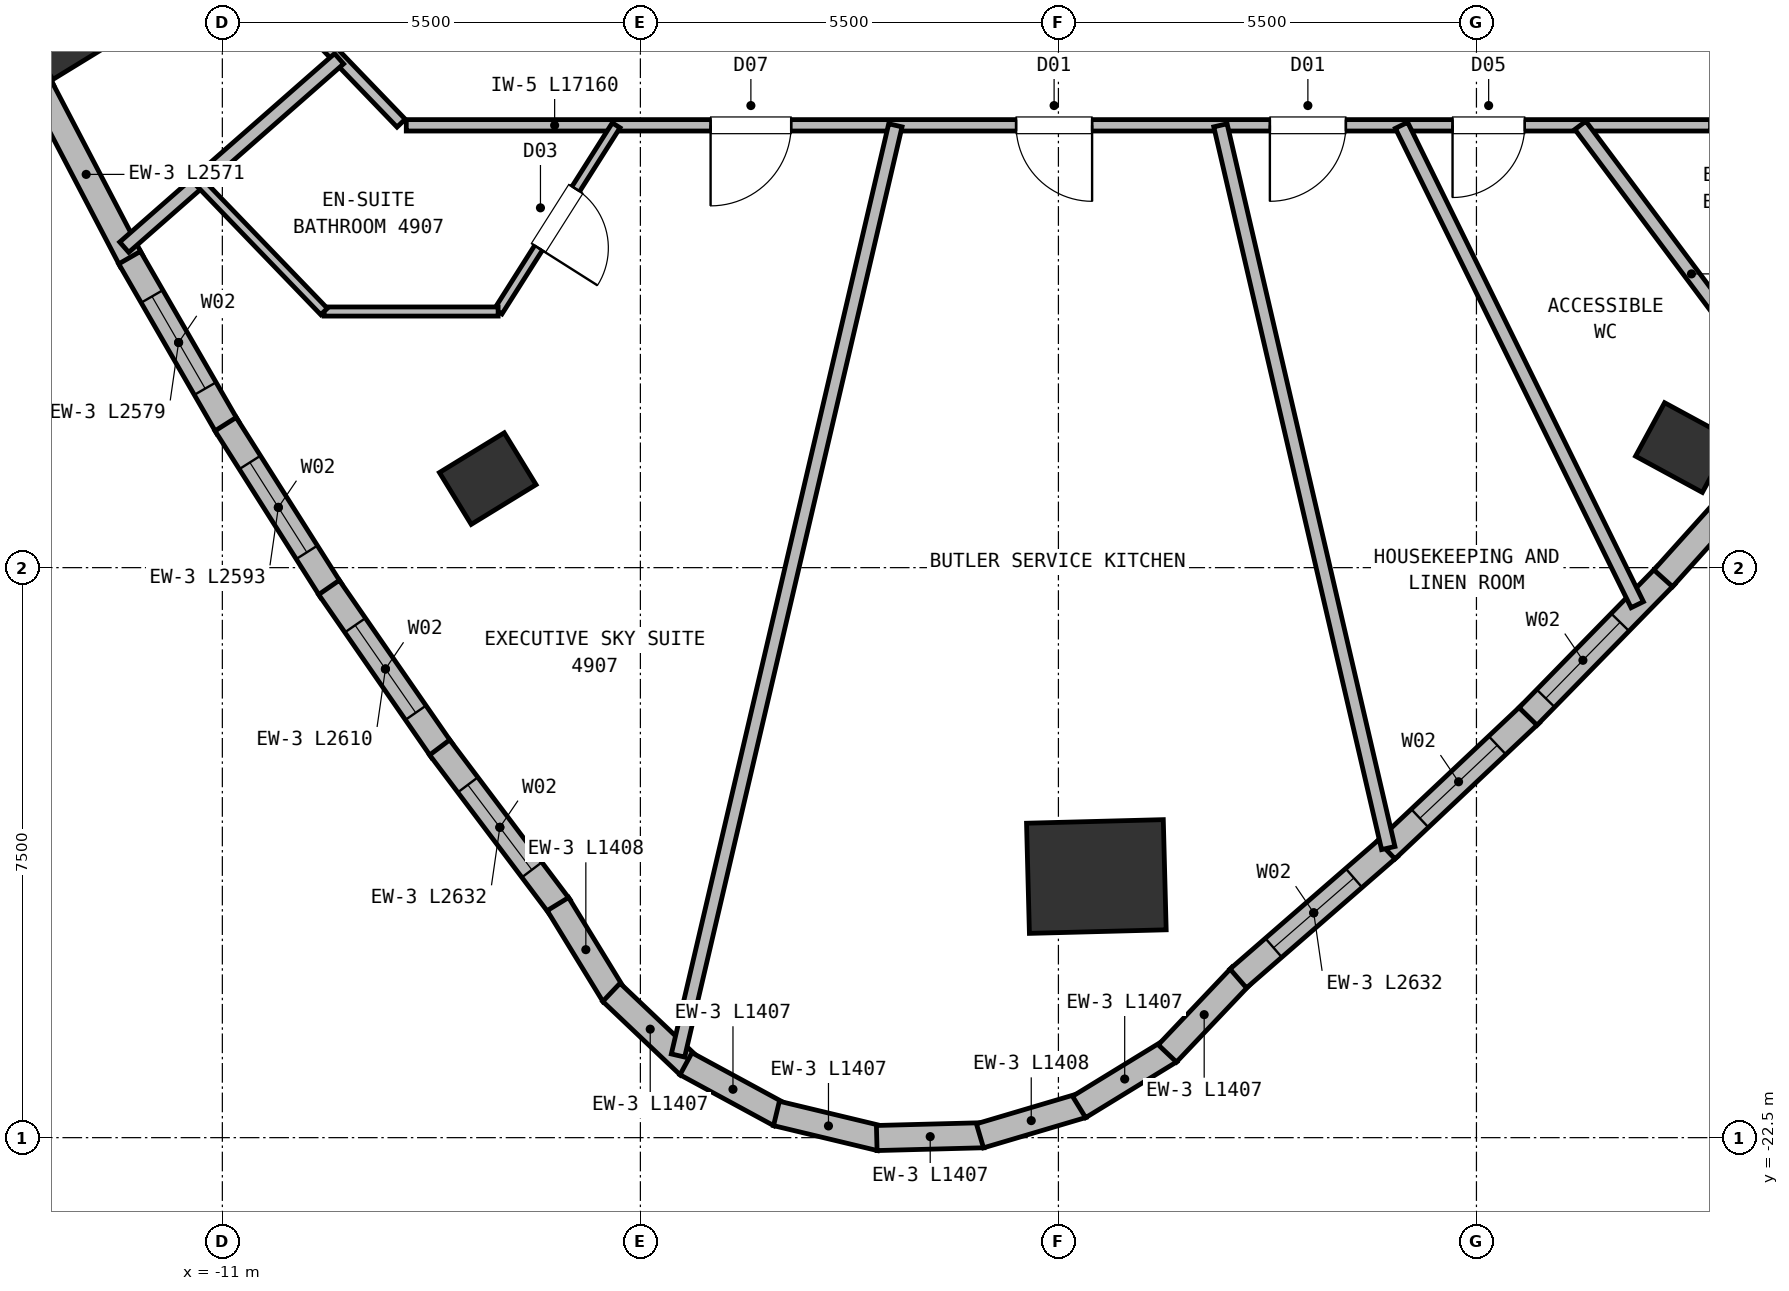
"""IFC4 building model, lengths in metres.
Left out: names, types, materials, properties, quantities, classifications, styles, units other than length and angle.
Written with IfcOpenShell. Run it as: python <this file> out.ifc"""

import sys

from ifc_helpers import new_model, si_unit, direction, frame, frame_2d, origin, origin_2d, place, context, subcontext, project, spatial, rectangle, extrude, element, fill, save


model = new_model("IFC4")
c1 = context("Model", 3, precision=1e-05, world=origin(), true_north=direction((0.0, 1.0)))
c2 = subcontext(c1, "Body", "Model", "MODEL_VIEW")
j1 = project(units=[si_unit("LENGTHUNIT", "METRE"), si_unit("PLANEANGLEUNIT", "RADIAN")], contexts=[c1])
p1 = place(None, origin())
s1 = spatial("IfcSite", under=j1, at=p1, CompositionType="ELEMENT")
p2 = place(p1, origin())
s2 = spatial("IfcBuilding", under=s1, at=p2, CompositionType="ELEMENT")
p3 = place(p2, frame((0.0, 0.0, 186.55)))
s3 = spatial("IfcBuildingStorey", under=s2, at=p3, CompositionType="ELEMENT", Elevation=186.55)
for number, where, z_axis, x_axis in (
    (1, (-13.012, -7.974, 0.0), (0.0, 0.0, 1.0), (-0.522, 0.853, 0.0)),
    (2, (-7.508, -13.828, 0.0), (0.0, 0.0, 1.0), (-0.522, 0.853, 0.0)),
):
    element("IfcColumn", number, at=place(p3, frame(where, z_axis=z_axis, x_axis=x_axis)), inside=s3, PredefinedType="COLUMN", context=c2, shape_type="SweptSolid", body=[
        extrude(rectangle(XDim=0.8, YDim=1.0, at=origin_2d()), origin(), (0.0, 0.0, 1.0), 3.8),
    ])
p4 = place(p3, frame((0.499, -19.064, 0.0), z_axis=(0.0, 0.0, 1.0), x_axis=(-0.026176948308, 0.999657324976, 0.0)))
e3 = element("IfcColumn", 3, at=p4, inside=s3, PredefinedType="COLUMN", context=c2, shape_type="SweptSolid", body=[
    extrude(rectangle(XDim=1.45, YDim=1.8, at=origin_2d()), origin(), (0.0, 0.0, 1.0), 3.8),
])
p5 = place(p3, frame((8.224, -13.42, 0.0), z_axis=(0.0, 0.0, 1.0), x_axis=(0.47715876026, 0.878817112662, 0.0)))
e4 = element("IfcColumn", 4, at=p5, inside=s3, PredefinedType="COLUMN", context=c2, shape_type="SweptSolid", body=[
    extrude(rectangle(XDim=0.8, YDim=1.0, at=origin_2d()), origin(), (0.0, 0.0, 1.0), 3.8),
])
p6 = place(p3, frame((-13.365, -8.731, 0.0), z_axis=(0.0, 0.0, 1.0), x_axis=(-0.425774125911, 0.90482948322, 0.0)))
e5 = element("IfcWall", 5, at=p6, inside=s3, PredefinedType="SOLIDWALL", context=c2, shape_type="SweptSolid", body=[
    extrude(rectangle(XDim=2.566, YDim=0.33, at=frame_2d((1.283, 0.0))), origin(), (0.0, 0.0, 1.0), 3.55),
])
p7 = place(p3, frame((-12.196, -10.965, 0.0), z_axis=(0.0, 0.0, 1.0), x_axis=(-0.463361004434, 0.886169611062, 0.0)))
e6 = element("IfcWall", 6, at=p7, inside=s3, PredefinedType="SOLIDWALL", context=c2, shape_type="SweptSolid", body=[
    extrude(rectangle(XDim=2.571, YDim=0.33, at=frame_2d((1.285, 0.0))), origin(), (0.0, 0.0, 1.0), 3.55),
])
p8 = place(p3, frame((-10.931, -13.155, 0.0), z_axis=(0.0, 0.0, 1.0), x_axis=(-0.499875407217, 0.866097325513, 0.0)))
e7 = element("IfcWall", 7, at=p8, inside=s3, PredefinedType="SOLIDWALL", context=c2, shape_type="SweptSolid", body=[
    extrude(rectangle(XDim=2.579, YDim=0.33, at=frame_2d((1.29, 0.0))), origin(), (0.0, 0.0, 1.0), 3.55),
])
p9 = place(p8, frame((0.59, 0.0, 0.72)))
e8 = element("IfcOpeningElement", 8, at=p9, cuts=e7, PredefinedType="OPENING", context=c2, shape_type="SweptSolid", body=[
    extrude(rectangle(XDim=1.4, YDim=1.84, at=frame_2d((0.7, 0.92))), frame((0.0, 0.175, 0.0), z_axis=(0.0, -1.0, 0.0), x_axis=(1.0, 0.0, 0.0)), (0.0, 0.0, 1.0), 0.35),
])
p10 = place(p3, frame((-9.569, -15.302, 0.0), z_axis=(0.0, 0.0, 1.0), x_axis=(-0.535186500918, 0.844733928072, 0.0)))
e9 = element("IfcWall", 9, at=p10, inside=s3, PredefinedType="SOLIDWALL", context=c2, shape_type="SweptSolid", body=[
    extrude(rectangle(XDim=2.593, YDim=0.33, at=frame_2d((1.296, 0.0))), origin(), (0.0, 0.0, 1.0), 3.55),
])
p11 = place(p10, frame((0.596, 0.0, 0.72)))
e10 = element("IfcOpeningElement", 10, at=p11, cuts=e9, PredefinedType="OPENING", context=c2, shape_type="SweptSolid", body=[
    extrude(rectangle(XDim=1.4, YDim=1.84, at=frame_2d((0.7, 0.92))), frame((0.0, 0.175, 0.0), z_axis=(0.0, -1.0, 0.0), x_axis=(1.0, 0.0, 0.0)), (0.0, 0.0, 1.0), 0.35),
])
p12 = place(p3, frame((-8.112, -17.406, 0.0), z_axis=(0.0, 0.0, 1.0), x_axis=(-0.569122418308, 0.822252803571, 0.0)))
e11 = element("IfcWall", 11, at=p12, inside=s3, PredefinedType="SOLIDWALL", context=c2, shape_type="SweptSolid", body=[
    extrude(rectangle(XDim=2.61, YDim=0.33, at=frame_2d((1.305, 0.0))), origin(), (0.0, 0.0, 1.0), 3.55),
])
p13 = place(p12, frame((0.605, 0.0, 0.72)))
e12 = element("IfcOpeningElement", 12, at=p13, cuts=e11, PredefinedType="OPENING", context=c2, shape_type="SweptSolid", body=[
    extrude(rectangle(XDim=1.4, YDim=1.84, at=frame_2d((0.7, 0.92))), frame((0.0, 0.175, 0.0), z_axis=(0.0, -1.0, 0.0), x_axis=(1.0, 0.0, 0.0)), (0.0, 0.0, 1.0), 0.35),
])
p14 = place(p3, frame((-6.557, -19.468, 0.0), z_axis=(0.0, 0.0, 1.0), x_axis=(-0.601735324528, 0.798695561034, 0.0)))
e13 = element("IfcWall", 13, at=p14, inside=s3, PredefinedType="SOLIDWALL", context=c2, shape_type="SweptSolid", body=[
    extrude(rectangle(XDim=2.632, YDim=0.33, at=frame_2d((1.316, 0.0))), origin(), (0.0, 0.0, 1.0), 3.55),
])
p15 = place(p14, frame((0.616, 0.0, 0.72)))
e14 = element("IfcOpeningElement", 14, at=p15, cuts=e13, PredefinedType="OPENING", context=c2, shape_type="SweptSolid", body=[
    extrude(rectangle(XDim=1.4, YDim=1.84, at=frame_2d((0.7, 0.92))), frame((0.0, 0.175, 0.0), z_axis=(0.0, -1.0, 0.0), x_axis=(1.0, 0.0, 0.0)), (0.0, 0.0, 1.0), 0.35),
])
for number, where, z_axis, x_axis in (
    (15, (-5.85, -20.627, 0.0), (0.0, 0.0, 1.0), (-0.522, 0.853, 0.0)),
    (16, (-4.86, -21.557, 0.0), (0.0, 0.0, 1.0), (-0.725, 0.688, 0.0)),
):
    element("IfcWall", number, at=place(p3, frame(where, z_axis=z_axis, x_axis=x_axis)), inside=s3, PredefinedType="SOLIDWALL", context=c2, shape_type="SweptSolid", body=[
        extrude(rectangle(XDim=1.407, YDim=0.33, at=frame_2d((0.704, 0.0))), origin(), (0.0, 0.0, 1.0), 3.55),
    ])
p16 = place(p3, frame((-3.663, -22.199, 0.0), z_axis=(0.0, 0.0, 1.0), x_axis=(-0.878861744685, 0.477076549129, 0.0)))
e17 = element("IfcWall", 17, at=p16, inside=s3, PredefinedType="SOLIDWALL", context=c2, shape_type="SweptSolid", body=[
    extrude(rectangle(XDim=1.407, YDim=0.33, at=frame_2d((0.704, 0.0))), origin(), (0.0, 0.0, 1.0), 3.55),
])
for number, where, z_axis, x_axis in (
    (18, (-2.341, -22.51, 0.0), (0.0, 0.0, 1.0), (-0.972, 0.233, 0.0)),
    (19, (-0.983, -22.468, 0.0), (0.0, 0.0, 1.0), (-1.0, -0.026, 0.0)),
    (20, (0.317, -22.076, 0.0), (0.0, 0.0, 1.0), (-0.959, -0.284, 0.0)),
):
    element("IfcWall", number, at=place(p3, frame(where, z_axis=z_axis, x_axis=x_axis)), inside=s3, PredefinedType="SOLIDWALL", context=c2, shape_type="SweptSolid", body=[
        extrude(rectangle(XDim=1.407, YDim=0.33, at=frame_2d((0.704, 0.0))), origin(), (0.0, 0.0, 1.0), 3.55),
    ])
p17 = place(p3, frame((1.472, -21.361, 0.0), z_axis=(0.0, 0.0, 1.0), x_axis=(-0.852633662668, -0.522509174355, 0.0)))
e21 = element("IfcWall", 21, at=p17, inside=s3, PredefinedType="SOLIDWALL", context=c2, shape_type="SweptSolid", body=[
    extrude(rectangle(XDim=1.407, YDim=0.33, at=frame_2d((0.704, 0.0))), origin(), (0.0, 0.0, 1.0), 3.55),
])
p18 = place(p3, frame((2.402, -20.371, 0.0), z_axis=(0.0, 0.0, 1.0), x_axis=(-0.688302566146, -0.725423722687, 0.0)))
e22 = element("IfcWall", 22, at=p18, inside=s3, PredefinedType="SOLIDWALL", context=c2, shape_type="SweptSolid", body=[
    extrude(rectangle(XDim=1.407, YDim=0.33, at=frame_2d((0.704, 0.0))), origin(), (0.0, 0.0, 1.0), 3.55),
])
p19 = place(p3, frame((4.352, -18.679, 0.0), z_axis=(0.0, 0.0, 1.0), x_axis=(-0.754647459821, -0.656130483505, 0.0)))
e23 = element("IfcWall", 23, at=p19, inside=s3, PredefinedType="SOLIDWALL", context=c2, shape_type="SweptSolid", body=[
    extrude(rectangle(XDim=2.632, YDim=0.33, at=frame_2d((1.316, 0.0))), origin(), (0.0, 0.0, 1.0), 3.55),
])
p20 = place(p19, frame((0.616, 0.0, 0.72)))
e24 = element("IfcOpeningElement", 24, at=p20, cuts=e23, PredefinedType="OPENING", context=c2, shape_type="SweptSolid", body=[
    extrude(rectangle(XDim=1.4, YDim=1.84, at=frame_2d((0.7, 0.92))), frame((0.0, 0.175, 0.0), z_axis=(0.0, -1.0, 0.0), x_axis=(1.0, 0.0, 0.0)), (0.0, 0.0, 1.0), 0.35),
])
p21 = place(p3, frame((6.215, -16.922, 0.0), z_axis=(0.0, 0.0, 1.0), x_axis=(-0.72774946529, -0.685843069346, 0.0)))
e25 = element("IfcWall", 25, at=p21, inside=s3, PredefinedType="SOLIDWALL", context=c2, shape_type="SweptSolid", body=[
    extrude(rectangle(XDim=2.61, YDim=0.33, at=frame_2d((1.305, 0.0))), origin(), (0.0, 0.0, 1.0), 3.55),
])
p22 = place(p21, frame((0.605, 0.0, 0.72)))
e26 = element("IfcOpeningElement", 26, at=p22, cuts=e25, PredefinedType="OPENING", context=c2, shape_type="SweptSolid", body=[
    extrude(rectangle(XDim=1.4, YDim=1.84, at=frame_2d((0.7, 0.92))), frame((0.0, 0.175, 0.0), z_axis=(0.0, -1.0, 0.0), x_axis=(1.0, 0.0, 0.0)), (0.0, 0.0, 1.0), 0.35),
])
p23 = place(p3, frame((7.991, -15.104, 0.0), z_axis=(0.0, 0.0, 1.0), x_axis=(-0.699057723408, -0.71506524132, 0.0)))
e27 = element("IfcWall", 27, at=p23, inside=s3, PredefinedType="SOLIDWALL", context=c2, shape_type="SweptSolid", body=[
    extrude(rectangle(XDim=2.593, YDim=0.33, at=frame_2d((1.296, 0.0))), origin(), (0.0, 0.0, 1.0), 3.55),
])
p24 = place(p23, frame((0.86, 0.0, 0.72)))
e28 = element("IfcOpeningElement", 28, at=p24, cuts=e27, PredefinedType="OPENING", context=c2, shape_type="SweptSolid", body=[
    extrude(rectangle(XDim=1.4, YDim=1.84, at=frame_2d((0.7, 0.92))), frame((0.0, 0.175, 0.0), z_axis=(0.0, -1.0, 0.0), x_axis=(1.0, 0.0, 0.0)), (0.0, 0.0, 1.0), 0.35),
])
p25 = place(p3, frame((9.683, -13.223, 0.0), z_axis=(0.0, 0.0, 1.0), x_axis=(-0.668980419183, -0.743280027143, 0.0)))
e29 = element("IfcWall", 29, at=p25, inside=s3, PredefinedType="SOLIDWALL", context=c2, shape_type="SweptSolid", body=[
    extrude(rectangle(XDim=2.579, YDim=0.33, at=frame_2d((1.29, 0.0))), origin(), (0.0, 0.0, 1.0), 3.55),
])
p26 = place(p3, frame((8.58, -9.18, 0.0), z_axis=(0.0, 0.0, 1.0), x_axis=(-1.0, 0.0, 0.0)))
e30 = element("IfcWall", 30, at=p26, inside=s3, PredefinedType="PARTITIONING", context=c2, shape_type="SweptSolid", body=[
    extrude(rectangle(XDim=17.16, YDim=0.15, at=frame_2d((8.58, 0.0))), origin(), (0.0, 0.0, 1.0), 3.23),
])
p27 = place(p26, frame((2.444, 0.0, 0.0)))
e31 = element("IfcOpeningElement", 31, at=p27, cuts=e30, PredefinedType="OPENING", context=c2, shape_type="SweptSolid", body=[
    extrude(rectangle(XDim=0.95, YDim=2.1, at=frame_2d((0.475, 1.05))), frame((0.0, 0.085, 0.0), z_axis=(0.0, -1.0, 0.0), x_axis=(1.0, 0.0, 0.0)), (0.0, 0.0, 1.0), 0.17),
])
p28 = place(p26, frame((4.798, 0.0, 0.0)))
e32 = element("IfcOpeningElement", 32, at=p28, cuts=e30, PredefinedType="OPENING", context=c2, shape_type="SweptSolid", body=[
    extrude(rectangle(XDim=1.0, YDim=2.15, at=frame_2d((0.5, 1.075))), frame((0.0, 0.085, 0.0), z_axis=(0.0, -1.0, 0.0), x_axis=(1.0, 0.0, 0.0)), (0.0, 0.0, 1.0), 0.17),
])
p29 = place(p26, frame((12.096, 0.0, 0.0)))
e33 = element("IfcOpeningElement", 33, at=p29, cuts=e30, PredefinedType="OPENING", context=c2, shape_type="SweptSolid", body=[
    extrude(rectangle(XDim=1.06, YDim=2.15, at=frame_2d((0.53, 1.075))), frame((0.0, 0.085, 0.0), z_axis=(0.0, -1.0, 0.0), x_axis=(1.0, 0.0, 0.0)), (0.0, 0.0, 1.0), 0.17),
])
p30 = place(p26, frame((8.137, 0.0, 0.0)))
e34 = element("IfcOpeningElement", 34, at=p30, cuts=e30, PredefinedType="OPENING", context=c2, shape_type="SweptSolid", body=[
    extrude(rectangle(XDim=1.0, YDim=2.15, at=frame_2d((0.5, 1.075))), frame((0.0, 0.085, 0.0), z_axis=(0.0, -1.0, 0.0), x_axis=(1.0, 0.0, 0.0)), (0.0, 0.0, 1.0), 0.17),
])
p31 = place(p3, frame((-8.648, -9.151, 0.0), z_axis=(0.0, 0.0, 1.0), x_axis=(-0.693764562202, 0.720201869085, 0.0)))
e35 = element("IfcWall", 35, at=p31, inside=s3, PredefinedType="PARTITIONING", context=c2, shape_type="SweptSolid", body=[
    extrude(rectangle(XDim=2.558, YDim=0.15, at=frame_2d((1.279, 0.0))), origin(), (0.0, 0.0, 1.0), 3.23),
])
p32 = place(p3, frame((6.867, -9.18, 0.0), z_axis=(0.0, 0.0, 1.0), x_axis=(0.598991453889, -0.800755417195, 0.0)))
e36 = element("IfcWall", 36, at=p32, inside=s3, PredefinedType="PARTITIONING", context=c2, shape_type="SweptSolid", body=[
    extrude(rectangle(XDim=4.883, YDim=0.18, at=frame_2d((2.441, 0.0))), origin(), (0.0, 0.0, 1.0), 3.55),
])
p33 = place(p3, frame((-9.464, -8.304, 0.0), z_axis=(0.0, 0.0, 1.0), x_axis=(-0.751699255643, -0.659506049302, 0.0)))
e37 = element("IfcWall", 37, at=p33, inside=s3, PredefinedType="PARTITIONING", context=c2, shape_type="SweptSolid", body=[
    extrude(rectangle(XDim=3.76, YDim=0.18, at=frame_2d((1.88, 0.0))), origin(), (0.0, 0.0, 1.0), 3.55),
])
p34 = place(p3, frame((-5.819, -9.18, 0.0), z_axis=(0.0, 0.0, 1.0), x_axis=(-0.535382431743, -0.844609763015, 0.0)))
e38 = element("IfcWall", 38, at=p34, inside=s3, PredefinedType="PARTITIONING", context=c2, shape_type="SweptSolid", body=[
    extrude(rectangle(XDim=2.901, YDim=0.12, at=frame_2d((1.45, 0.0))), origin(), (0.0, 0.0, 1.0), 3.55),
])
p35 = place(p34, frame((0.99, 0.0, 0.0)))
e39 = element("IfcOpeningElement", 39, at=p35, cuts=e38, PredefinedType="OPENING", context=c2, shape_type="SweptSolid", body=[
    extrude(rectangle(XDim=0.92, YDim=2.1, at=frame_2d((0.46, 1.05))), frame((0.0, 0.07, 0.0), z_axis=(0.0, -1.0, 0.0), x_axis=(1.0, 0.0, 0.0)), (0.0, 0.0, 1.0), 0.14),
])
p36 = place(p3, frame((-7.372, -11.63, 0.0), z_axis=(0.0, 0.0, 1.0), x_axis=(-1.0, 0.0, 0.0)))
e40 = element("IfcWall", 40, at=p36, inside=s3, PredefinedType="PARTITIONING", context=c2, shape_type="SweptSolid", body=[
    extrude(rectangle(XDim=2.29, YDim=0.12, at=frame_2d((1.145, 0.0))), origin(), (0.0, 0.0, 1.0), 3.55),
])
p37 = place(p3, frame((-11.308, -9.921, 0.0), z_axis=(0.0, 0.0, 1.0), x_axis=(0.693706945125, -0.7202573667, 0.0)))
e41 = element("IfcWall", 41, at=p37, inside=s3, PredefinedType="PARTITIONING", context=c2, shape_type="SweptSolid", body=[
    extrude(rectangle(XDim=2.372, YDim=0.12, at=frame_2d((1.186, 0.0))), origin(), (0.0, 0.0, 1.0), 2.98),
])
p38 = place(p3, frame((-2.145, -9.18, 0.0), z_axis=(0.0, 0.0, 1.0), x_axis=(-0.22755258656, -0.973765793376, 0.0)))
e42 = element("IfcWall", 42, at=p38, inside=s3, PredefinedType="PARTITIONING", context=c2, shape_type="SweptSolid", body=[
    extrude(rectangle(XDim=12.569, YDim=0.18, at=frame_2d((6.285, 0.0))), origin(), (0.0, 0.0, 1.0), 3.55),
])
p39 = place(p3, frame((2.132, -9.18, 0.0), z_axis=(0.0, 0.0, 1.0), x_axis=(0.226196232917, -0.974081754379, 0.0)))
e43 = element("IfcWall", 43, at=p39, inside=s3, PredefinedType="PARTITIONING", context=c2, shape_type="SweptSolid", body=[
    extrude(rectangle(XDim=9.762, YDim=0.18, at=frame_2d((4.881, 0.0))), origin(), (0.0, 0.0, 1.0), 3.55),
])
p40 = place(p3, frame((4.514, -9.18, 0.0), z_axis=(0.0, 0.0, 1.0), x_axis=(0.441285267702, -0.897366877319, 0.0)))
e44 = element("IfcWall", 44, at=p40, inside=s3, PredefinedType="PARTITIONING", context=c2, shape_type="SweptSolid", body=[
    extrude(rectangle(XDim=7.029, YDim=0.18, at=frame_2d((3.515, 0.0))), origin(), (0.0, 0.0, 1.0), 3.55),
])
p41 = place(p9, origin())
e45 = element("IfcWindow", 45, at=p41, inside=s3, PartitioningType="SINGLE_PANEL", PredefinedType="WINDOW", context=c2, shape_type="SweptSolid", body=[
    extrude(rectangle(XDim=1.4, YDim=1.84, at=frame_2d((0.7, 0.92))), frame((0.0, 0.03, 0.0), z_axis=(0.0, -1.0, 0.0), x_axis=(1.0, 0.0, 0.0)), (0.0, 0.0, 1.0), 0.06),
])
fill(e8, e45)
p42 = place(p11, origin())
e46 = element("IfcWindow", 46, at=p42, inside=s3, PartitioningType="SINGLE_PANEL", PredefinedType="WINDOW", context=c2, shape_type="SweptSolid", body=[
    extrude(rectangle(XDim=1.4, YDim=1.84, at=frame_2d((0.7, 0.92))), frame((0.0, 0.03, 0.0), z_axis=(0.0, -1.0, 0.0), x_axis=(1.0, 0.0, 0.0)), (0.0, 0.0, 1.0), 0.06),
])
fill(e10, e46)
p43 = place(p13, origin())
e47 = element("IfcWindow", 47, at=p43, inside=s3, PartitioningType="SINGLE_PANEL", PredefinedType="WINDOW", context=c2, shape_type="SweptSolid", body=[
    extrude(rectangle(XDim=1.4, YDim=1.84, at=frame_2d((0.7, 0.92))), frame((0.0, 0.03, 0.0), z_axis=(0.0, -1.0, 0.0), x_axis=(1.0, 0.0, 0.0)), (0.0, 0.0, 1.0), 0.06),
])
fill(e12, e47)
p44 = place(p15, origin())
e48 = element("IfcWindow", 48, at=p44, inside=s3, PartitioningType="SINGLE_PANEL", PredefinedType="WINDOW", context=c2, shape_type="SweptSolid", body=[
    extrude(rectangle(XDim=1.4, YDim=1.84, at=frame_2d((0.7, 0.92))), frame((0.0, 0.03, 0.0), z_axis=(0.0, -1.0, 0.0), x_axis=(1.0, 0.0, 0.0)), (0.0, 0.0, 1.0), 0.06),
])
fill(e14, e48)
p45 = place(p20, origin())
e49 = element("IfcWindow", 49, at=p45, inside=s3, PartitioningType="SINGLE_PANEL", PredefinedType="WINDOW", context=c2, shape_type="SweptSolid", body=[
    extrude(rectangle(XDim=1.4, YDim=1.84, at=frame_2d((0.7, 0.92))), frame((0.0, 0.03, 0.0), z_axis=(0.0, -1.0, 0.0), x_axis=(1.0, 0.0, 0.0)), (0.0, 0.0, 1.0), 0.06),
])
fill(e24, e49)
p46 = place(p22, origin())
e50 = element("IfcWindow", 50, at=p46, inside=s3, PartitioningType="SINGLE_PANEL", PredefinedType="WINDOW", context=c2, shape_type="SweptSolid", body=[
    extrude(rectangle(XDim=1.4, YDim=1.84, at=frame_2d((0.7, 0.92))), frame((0.0, 0.03, 0.0), z_axis=(0.0, -1.0, 0.0), x_axis=(1.0, 0.0, 0.0)), (0.0, 0.0, 1.0), 0.06),
])
fill(e26, e50)
p47 = place(p24, origin())
e51 = element("IfcWindow", 51, at=p47, inside=s3, PartitioningType="SINGLE_PANEL", PredefinedType="WINDOW", context=c2, shape_type="SweptSolid", body=[
    extrude(rectangle(XDim=1.4, YDim=1.84, at=frame_2d((0.7, 0.92))), frame((0.0, 0.03, 0.0), z_axis=(0.0, -1.0, 0.0), x_axis=(1.0, 0.0, 0.0)), (0.0, 0.0, 1.0), 0.06),
])
fill(e28, e51)
p48 = place(p35, origin())
e52 = element("IfcDoor", 52, at=p48, inside=s3, OperationType="SINGLE_SWING_RIGHT", PredefinedType="DOOR", context=c2, shape_type="SweptSolid", body=[
    extrude(rectangle(XDim=0.92, YDim=2.1, at=frame_2d((0.46, 1.05))), frame((0.0, 0.025, 0.0), z_axis=(0.0, -1.0, 0.0), x_axis=(1.0, 0.0, 0.0)), (0.0, 0.0, 1.0), 0.05),
])
fill(e39, e52)
p49 = place(p27, origin())
e53 = element("IfcDoor", 53, at=p49, inside=s3, OperationType="SINGLE_SWING_RIGHT", PredefinedType="DOOR", context=c2, shape_type="SweptSolid", body=[
    extrude(rectangle(XDim=0.95, YDim=2.1, at=frame_2d((0.475, 1.05))), frame((0.0, 0.025, 0.0), z_axis=(0.0, -1.0, 0.0), x_axis=(1.0, 0.0, 0.0)), (0.0, 0.0, 1.0), 0.05),
])
fill(e31, e53)
p50 = place(p28, origin())
e54 = element("IfcDoor", 54, at=p50, inside=s3, OperationType="SINGLE_SWING_RIGHT", PredefinedType="DOOR", context=c2, shape_type="SweptSolid", body=[
    extrude(rectangle(XDim=1.0, YDim=2.15, at=frame_2d((0.5, 1.075))), frame((0.0, 0.025, 0.0), z_axis=(0.0, -1.0, 0.0), x_axis=(1.0, 0.0, 0.0)), (0.0, 0.0, 1.0), 0.05),
])
fill(e32, e54)
p51 = place(p29, origin())
e55 = element("IfcDoor", 55, at=p51, inside=s3, OperationType="SINGLE_SWING_RIGHT", PredefinedType="DOOR", context=c2, shape_type="SweptSolid", body=[
    extrude(rectangle(XDim=1.06, YDim=2.15, at=frame_2d((0.53, 1.075))), frame((0.0, 0.025, 0.0), z_axis=(0.0, -1.0, 0.0), x_axis=(1.0, 0.0, 0.0)), (0.0, 0.0, 1.0), 0.05),
])
fill(e33, e55)
p52 = place(p30, origin())
e56 = element("IfcDoor", 56, at=p52, inside=s3, OperationType="SINGLE_SWING_LEFT", PredefinedType="DOOR", context=c2, shape_type="SweptSolid", body=[
    extrude(rectangle(XDim=1.0, YDim=2.15, at=frame_2d((0.5, 1.075))), frame((0.0, 0.025, 0.0), z_axis=(0.0, -1.0, 0.0), x_axis=(1.0, 0.0, 0.0)), (0.0, 0.0, 1.0), 0.05),
])
fill(e34, e56)
save(model, sys.argv[1])
